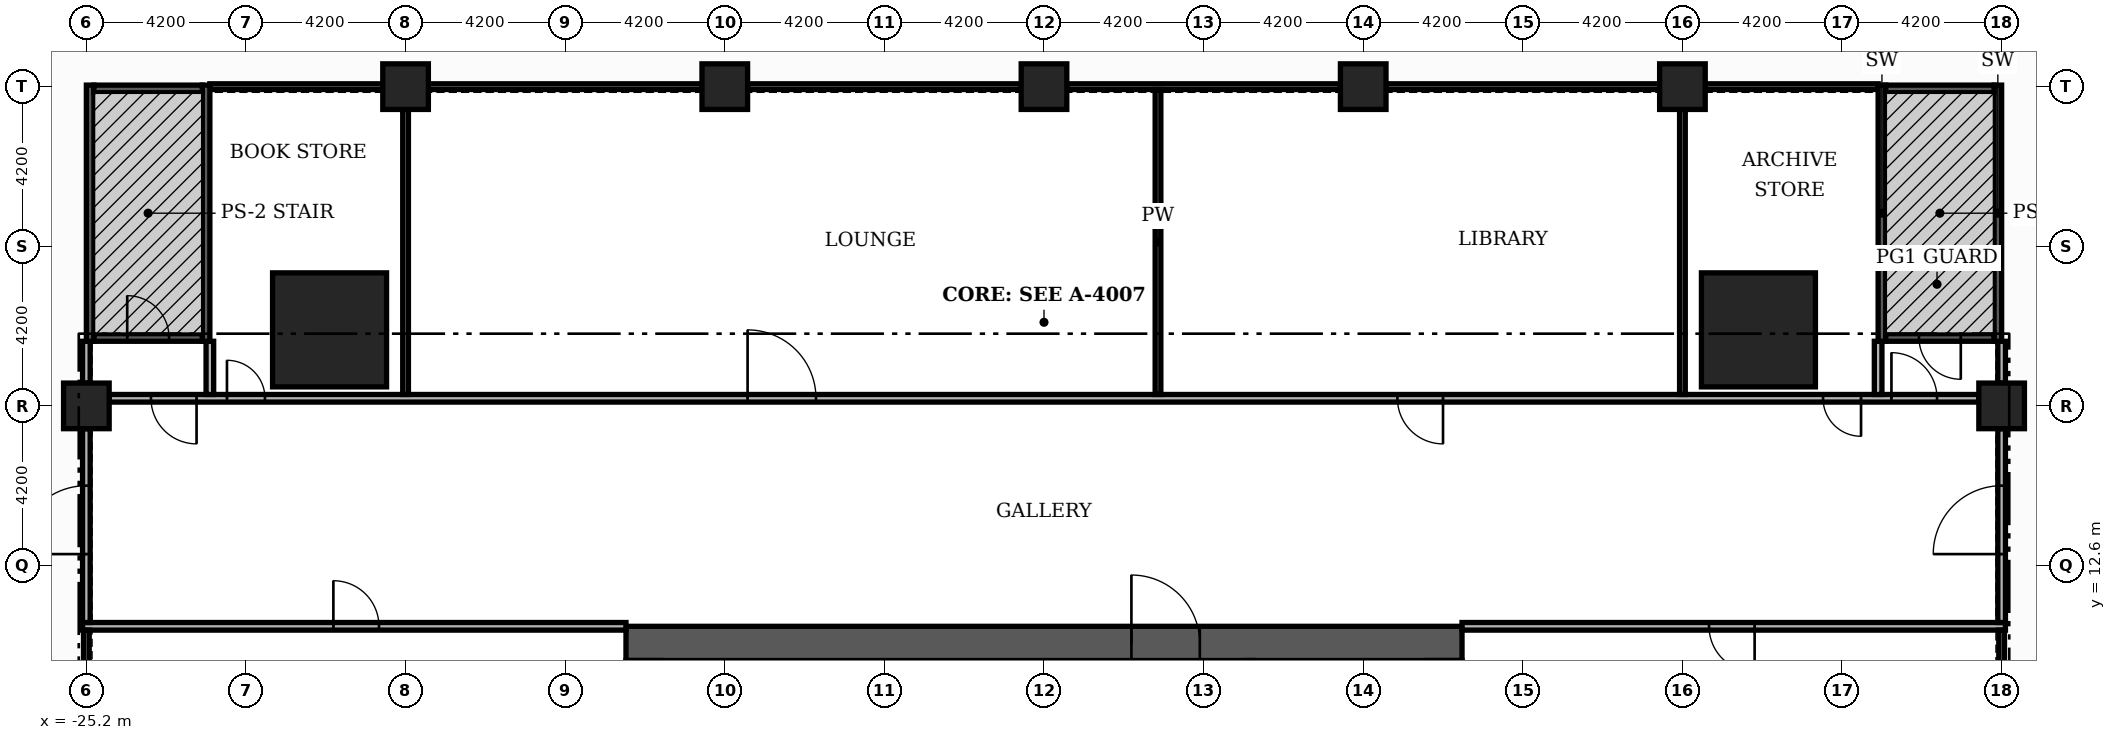
"""IFC4 building model, lengths in metres.
Left out: names, types, materials, properties, quantities, classifications, styles, units other than length and angle.
Written with IfcOpenShell. Run it as: python <this file> out.ifc"""

import sys

from ifc_helpers import new_model, si_unit, direction, frame, frame_2d, origin, origin_2d, place, context, subcontext, project, spatial, rectangle, extrude, element, fill, save


model = new_model("IFC4")
c1 = context("Model", 3, precision=1e-05, world=origin(), true_north=direction((0.0, 1.0)))
c2 = subcontext(c1, "Body", "Model", "MODEL_VIEW")
j1 = project(units=[si_unit("LENGTHUNIT", "METRE"), si_unit("PLANEANGLEUNIT", "RADIAN")], contexts=[c1])
p1 = place(None, origin())
s1 = spatial("IfcSite", under=j1, at=p1, CompositionType="ELEMENT")
p2 = place(p1, origin())
s2 = spatial("IfcBuilding", under=s1, at=p2, CompositionType="ELEMENT")
p3 = place(p2, frame((0.0, 0.0, 22.2)))
s3 = spatial("IfcBuildingStorey", under=s2, at=p3, CompositionType="ELEMENT", Elevation=22.2)
p4 = place(p3, frame((-11.0, 10.55, 0.0), z_axis=(0.0, 0.0, 1.0), x_axis=(1.0, 0.0, 0.0)))
e1 = element("IfcWall", 1, at=p4, inside=s3, PredefinedType="SHEAR", context=c2, shape_type="SweptSolid", body=[
    extrude(rectangle(XDim=22.0, YDim=0.9, at=frame_2d((11.0, 0.0))), origin(), (0.0, 0.0, 1.0), 4.3),
])
p5 = place(p4, frame((13.3, 0.0, 0.0)))
e2 = element("IfcOpeningElement", 2, at=p5, cuts=e1, PredefinedType="OPENING", context=c2, shape_type="SweptSolid", body=[
    extrude(rectangle(XDim=1.8, YDim=2.2, at=frame_2d((0.9, 1.1))), frame((0.0, 0.46, 0.0), z_axis=(0.0, -1.0, 0.0), x_axis=(1.0, 0.0, 0.0)), (0.0, 0.0, 1.0), 0.92),
])
for number, where, z_axis, x_axis in (
    (3, (18.8, 18.8, 0.0), (0.0, 0.0, 1.0), (1.0, 0.0, 0.0)),
    (4, (-18.8, 18.8, 0.0), (0.0, 0.0, 1.0), (1.0, 0.0, 0.0)),
):
    element("IfcColumn", number, at=place(p3, frame(where, z_axis=z_axis, x_axis=x_axis)), inside=s3, PredefinedType="COLUMN", context=c2, shape_type="SweptSolid", body=[
        extrude(rectangle(XDim=3.0, YDim=3.0, at=origin_2d()), origin(), (0.0, 0.0, 1.0), 4.8),
    ])
for number, where, z_axis, x_axis in (
    (5, (25.2, 16.8, 0.0), (0.0, 0.0, 1.0), (1.0, 0.0, 0.0)),
    (6, (0.0, 25.2, 0.0), (0.0, 0.0, 1.0), (1.0, 0.0, 0.0)),
    (7, (-8.4, 25.2, 0.0), (0.0, 0.0, 1.0), (1.0, 0.0, 0.0)),
    (8, (-16.8, 25.2, 0.0), (0.0, 0.0, 1.0), (1.0, 0.0, 0.0)),
    (9, (8.4, 25.2, 0.0), (0.0, 0.0, 1.0), (1.0, 0.0, 0.0)),
    (10, (16.8, 25.2, 0.0), (0.0, 0.0, 1.0), (1.0, 0.0, 0.0)),
    (11, (-25.2, 16.8, 0.0), (0.0, 0.0, 1.0), (1.0, 0.0, 0.0)),
):
    element("IfcColumn", number, at=place(p3, frame(where, z_axis=z_axis, x_axis=x_axis)), inside=s3, PredefinedType="COLUMN", context=c2, shape_type="SweptSolid", body=[
        extrude(rectangle(XDim=1.2, YDim=1.2, at=origin_2d()), origin(), (0.0, 0.0, 1.0), 4.8),
    ])
p6 = place(p3, frame((-25.3, 11.0, 0.0), z_axis=(0.0, 0.0, 1.0), x_axis=(1.0, 0.0, 0.0)))
e12 = element("IfcWall", 12, at=p6, inside=s3, PredefinedType="PARTITIONING", context=c2, shape_type="SweptSolid", body=[
    extrude(rectangle(XDim=14.3, YDim=0.2, at=frame_2d((7.15, 0.0))), origin(), (0.0, 0.0, 1.0), 4.3),
])
p7 = place(p6, frame((6.6, 0.0, 0.0)))
e13 = element("IfcOpeningElement", 13, at=p7, cuts=e12, PredefinedType="OPENING", context=c2, shape_type="SweptSolid", body=[
    extrude(rectangle(XDim=1.2, YDim=2.2, at=frame_2d((0.6, 1.1))), frame((0.0, 0.11, 0.0), z_axis=(0.0, -1.0, 0.0), x_axis=(1.0, 0.0, 0.0)), (0.0, 0.0, 1.0), 0.22),
])
p8 = place(p3, frame((11.0, 11.0, 0.0), z_axis=(0.0, 0.0, 1.0), x_axis=(1.0, 0.0, 0.0)))
e14 = element("IfcWall", 14, at=p8, inside=s3, PredefinedType="PARTITIONING", context=c2, shape_type="SweptSolid", body=[
    extrude(rectangle(XDim=14.3, YDim=0.2, at=frame_2d((7.15, 0.0))), origin(), (0.0, 0.0, 1.0), 4.3),
])
p9 = place(p8, frame((6.5, 0.0, 0.0)))
e15 = element("IfcOpeningElement", 15, at=p9, cuts=e14, PredefinedType="OPENING", context=c2, shape_type="SweptSolid", body=[
    extrude(rectangle(XDim=1.2, YDim=2.2, at=frame_2d((0.6, 1.1))), frame((0.0, 0.11, 0.0), z_axis=(0.0, -1.0, 0.0), x_axis=(1.0, 0.0, 0.0)), (0.0, 0.0, 1.0), 0.22),
])
p10 = place(p3, frame((-24.6, 17.0, 0.0), z_axis=(0.0, 0.0, 1.0), x_axis=(1.0, 0.0, 0.0)))
e16 = element("IfcWall", 16, at=p10, inside=s3, PredefinedType="PARTITIONING", context=c2, shape_type="SweptSolid", body=[
    extrude(rectangle(XDim=49.2, YDim=0.2, at=frame_2d((24.6, 0.0))), origin(), (0.0, 0.0, 1.0), 4.3),
])
p11 = place(p10, frame((1.1, 0.0, 0.0)))
e17 = element("IfcOpeningElement", 17, at=p11, cuts=e16, PredefinedType="OPENING", context=c2, shape_type="SweptSolid", body=[
    extrude(rectangle(XDim=1.2, YDim=2.2, at=frame_2d((0.6, 1.1))), frame((0.0, 0.11, 0.0), z_axis=(0.0, -1.0, 0.0), x_axis=(1.0, 0.0, 0.0)), (0.0, 0.0, 1.0), 0.22),
])
p12 = place(p10, frame((3.1, 0.0, 0.0)))
e18 = element("IfcOpeningElement", 18, at=p12, cuts=e16, PredefinedType="OPENING", context=c2, shape_type="SweptSolid", body=[
    extrude(rectangle(XDim=1.0, YDim=2.1, at=frame_2d((0.5, 1.05))), frame((0.0, 0.11, 0.0), z_axis=(0.0, -1.0, 0.0), x_axis=(1.0, 0.0, 0.0)), (0.0, 0.0, 1.0), 0.22),
])
p13 = place(p10, frame((16.8, 0.0, 0.0)))
e19 = element("IfcOpeningElement", 19, at=p13, cuts=e16, PredefinedType="OPENING", context=c2, shape_type="SweptSolid", body=[
    extrude(rectangle(XDim=1.8, YDim=2.2, at=frame_2d((0.9, 1.1))), frame((0.0, 0.11, 0.0), z_axis=(0.0, -1.0, 0.0), x_axis=(1.0, 0.0, 0.0)), (0.0, 0.0, 1.0), 0.22),
])
p14 = place(p10, frame((33.9, 0.0, 0.0)))
e20 = element("IfcOpeningElement", 20, at=p14, cuts=e16, PredefinedType="OPENING", context=c2, shape_type="SweptSolid", body=[
    extrude(rectangle(XDim=1.2, YDim=2.2, at=frame_2d((0.6, 1.1))), frame((0.0, 0.11, 0.0), z_axis=(0.0, -1.0, 0.0), x_axis=(1.0, 0.0, 0.0)), (0.0, 0.0, 1.0), 0.22),
])
p15 = place(p10, frame((45.1, 0.0, 0.0)))
e21 = element("IfcOpeningElement", 21, at=p15, cuts=e16, PredefinedType="OPENING", context=c2, shape_type="SweptSolid", body=[
    extrude(rectangle(XDim=1.0, YDim=2.1, at=frame_2d((0.5, 1.05))), frame((0.0, 0.11, 0.0), z_axis=(0.0, -1.0, 0.0), x_axis=(1.0, 0.0, 0.0)), (0.0, 0.0, 1.0), 0.22),
])
p16 = place(p10, frame((46.9, 0.0, 0.0)))
e22 = element("IfcOpeningElement", 22, at=p16, cuts=e16, PredefinedType="OPENING", context=c2, shape_type="SweptSolid", body=[
    extrude(rectangle(XDim=1.2, YDim=2.2, at=frame_2d((0.6, 1.1))), frame((0.0, 0.11, 0.0), z_axis=(0.0, -1.0, 0.0), x_axis=(1.0, 0.0, 0.0)), (0.0, 0.0, 1.0), 0.22),
])
p17 = place(p3, frame((-21.95, 25.2, 0.0), z_axis=(0.0, 0.0, 1.0), x_axis=(1.0, 0.0, 0.0)))
e23 = element("IfcWall", 23, at=p17, inside=s3, PredefinedType="PARTITIONING", context=c2, shape_type="SweptSolid", body=[
    extrude(rectangle(XDim=4.55, YDim=0.15, at=frame_2d((2.275, 0.0))), origin(), (0.0, 0.0, 1.0), 4.3),
])
for number, where, z_axis, x_axis in (
    (24, (-16.2, 25.2, 0.0), (0.0, 0.0, 1.0), (1.0, 0.0, 0.0)),
    (25, (-7.8, 25.2, 0.0), (0.0, 0.0, 1.0), (1.0, 0.0, 0.0)),
    (26, (0.6, 25.2, 0.0), (0.0, 0.0, 1.0), (1.0, 0.0, 0.0)),
    (27, (9.0, 25.2, 0.0), (0.0, 0.0, 1.0), (1.0, 0.0, 0.0)),
):
    element("IfcWall", number, at=place(p3, frame(where, z_axis=z_axis, x_axis=x_axis)), inside=s3, PredefinedType="PARTITIONING", context=c2, shape_type="SweptSolid", body=[
        extrude(rectangle(XDim=7.2, YDim=0.15, at=frame_2d((3.6, 0.0))), origin(), (0.0, 0.0, 1.0), 4.3),
    ])
p18 = place(p3, frame((17.4, 25.2, 0.0), z_axis=(0.0, 0.0, 1.0), x_axis=(1.0, 0.0, 0.0)))
e28 = element("IfcWall", 28, at=p18, inside=s3, PredefinedType="PARTITIONING", context=c2, shape_type="SweptSolid", body=[
    extrude(rectangle(XDim=4.55, YDim=0.15, at=frame_2d((2.275, 0.0))), origin(), (0.0, 0.0, 1.0), 4.3),
])
p19 = place(p3, frame((-25.2, 9.0, 0.0), z_axis=(0.0, 0.0, 1.0), x_axis=(0.0, 1.0, 0.0)))
e29 = element("IfcWall", 29, at=p19, inside=s3, PredefinedType="PARTITIONING", context=c2, shape_type="SweptSolid", body=[
    extrude(rectangle(XDim=1.9, YDim=0.15, at=frame_2d((0.95, 0.0))), origin(), (0.0, 0.0, 1.0), 4.3),
])
p20 = place(p3, frame((-25.2, 11.1, 0.0), z_axis=(0.0, 0.0, 1.0), x_axis=(0.0, 1.0, 0.0)))
e30 = element("IfcWall", 30, at=p20, inside=s3, PredefinedType="PARTITIONING", context=c2, shape_type="SweptSolid", body=[
    extrude(rectangle(XDim=5.1, YDim=0.2, at=frame_2d((2.55, 0.0))), origin(), (0.0, 0.0, 1.0), 4.3),
])
p21 = place(p20, frame((1.8, 0.0, 0.0)))
e31 = element("IfcOpeningElement", 31, at=p21, cuts=e30, PredefinedType="OPENING", context=c2, shape_type="SweptSolid", body=[
    extrude(rectangle(XDim=1.8, YDim=2.2, at=frame_2d((0.9, 1.1))), frame((0.0, 0.11, 0.0), z_axis=(0.0, -1.0, 0.0), x_axis=(1.0, 0.0, 0.0)), (0.0, 0.0, 1.0), 0.22),
])
p22 = place(p3, frame((-25.2, 17.4, 0.0), z_axis=(0.0, 0.0, 1.0), x_axis=(0.0, 1.0, 0.0)))
e32 = element("IfcWall", 32, at=p22, inside=s3, PredefinedType="PARTITIONING", context=c2, shape_type="SweptSolid", body=[
    extrude(rectangle(XDim=1.1, YDim=0.2, at=frame_2d((0.55, 0.0))), origin(), (0.0, 0.0, 1.0), 4.3),
])
p23 = place(p3, frame((-21.95, 17.1, 0.0), z_axis=(0.0, 0.0, 1.0), x_axis=(0.0, 1.0, 0.0)))
e33 = element("IfcWall", 33, at=p23, inside=s3, PredefinedType="PARTITIONING", context=c2, shape_type="SweptSolid", body=[
    extrude(rectangle(XDim=1.4, YDim=0.2, at=frame_2d((0.7, 0.0))), origin(), (0.0, 0.0, 1.0), 4.3),
])
p24 = place(p3, frame((-16.8, 17.1, 0.0), z_axis=(0.0, 0.0, 1.0), x_axis=(0.0, 1.0, 0.0)))
e34 = element("IfcWall", 34, at=p24, inside=s3, PredefinedType="PARTITIONING", context=c2, shape_type="SweptSolid", body=[
    extrude(rectangle(XDim=7.5, YDim=0.15, at=frame_2d((3.75, 0.0))), origin(), (0.0, 0.0, 1.0), 4.3),
])
p25 = place(p3, frame((3.0, 17.1, 0.0), z_axis=(0.0, 0.0, 1.0), x_axis=(0.0, 1.0, 0.0)))
e35 = element("IfcWall", 35, at=p25, inside=s3, PredefinedType="PARTITIONING", context=c2, shape_type="SweptSolid", body=[
    extrude(rectangle(XDim=8.025, YDim=0.15, at=frame_2d((4.012, 0.0))), origin(), (0.0, 0.0, 1.0), 4.3),
])
p26 = place(p3, frame((16.8, 17.1, 0.0), z_axis=(0.0, 0.0, 1.0), x_axis=(0.0, 1.0, 0.0)))
e36 = element("IfcWall", 36, at=p26, inside=s3, PredefinedType="PARTITIONING", context=c2, shape_type="SweptSolid", body=[
    extrude(rectangle(XDim=7.5, YDim=0.15, at=frame_2d((3.75, 0.0))), origin(), (0.0, 0.0, 1.0), 4.3),
])
p27 = place(p3, frame((21.95, 17.1, 0.0), z_axis=(0.0, 0.0, 1.0), x_axis=(0.0, 1.0, 0.0)))
e37 = element("IfcWall", 37, at=p27, inside=s3, PredefinedType="PARTITIONING", context=c2, shape_type="SweptSolid", body=[
    extrude(rectangle(XDim=1.4, YDim=0.2, at=frame_2d((0.7, 0.0))), origin(), (0.0, 0.0, 1.0), 4.3),
])
p28 = place(p3, frame((25.2, 9.0, 0.0), z_axis=(0.0, 0.0, 1.0), x_axis=(0.0, 1.0, 0.0)))
e38 = element("IfcWall", 38, at=p28, inside=s3, PredefinedType="PARTITIONING", context=c2, shape_type="SweptSolid", body=[
    extrude(rectangle(XDim=1.9, YDim=0.15, at=frame_2d((0.95, 0.0))), origin(), (0.0, 0.0, 1.0), 4.3),
])
p29 = place(p3, frame((25.2, 11.1, 0.0), z_axis=(0.0, 0.0, 1.0), x_axis=(0.0, 1.0, 0.0)))
e39 = element("IfcWall", 39, at=p29, inside=s3, PredefinedType="PARTITIONING", context=c2, shape_type="SweptSolid", body=[
    extrude(rectangle(XDim=5.1, YDim=0.2, at=frame_2d((2.55, 0.0))), origin(), (0.0, 0.0, 1.0), 4.3),
])
p30 = place(p29, frame((1.8, 0.0, 0.0)))
e40 = element("IfcOpeningElement", 40, at=p30, cuts=e39, PredefinedType="OPENING", context=c2, shape_type="SweptSolid", body=[
    extrude(rectangle(XDim=1.8, YDim=2.2, at=frame_2d((0.9, 1.1))), frame((0.0, 0.11, 0.0), z_axis=(0.0, -1.0, 0.0), x_axis=(1.0, 0.0, 0.0)), (0.0, 0.0, 1.0), 0.22),
])
p31 = place(p3, frame((25.2, 17.4, 0.0), z_axis=(0.0, 0.0, 1.0), x_axis=(0.0, 1.0, 0.0)))
e41 = element("IfcWall", 41, at=p31, inside=s3, PredefinedType="PARTITIONING", context=c2, shape_type="SweptSolid", body=[
    extrude(rectangle(XDim=1.1, YDim=0.2, at=frame_2d((0.55, 0.0))), origin(), (0.0, 0.0, 1.0), 4.3),
])
for number, where, z_axis, x_axis in (
    (42, (22.05, 18.5, 0.0), (0.0, 0.0, 1.0), (0.0, 1.0, 0.0)),
    (43, (25.1, 18.5, 0.0), (0.0, 0.0, 1.0), (0.0, 1.0, 0.0)),
):
    element("IfcWall", number, at=place(p3, frame(where, z_axis=z_axis, x_axis=x_axis)), inside=s3, PredefinedType="SOLIDWALL", context=c2, shape_type="SweptSolid", body=[
        extrude(rectangle(XDim=6.74, YDim=0.2, at=frame_2d((3.37, 0.0))), origin(), (0.0, 0.0, 1.0), 4.3),
    ])
p32 = place(p3, frame((22.15, 18.6, 0.0), z_axis=(0.0, 0.0, 1.0), x_axis=(1.0, 0.0, 0.0)))
e44 = element("IfcWall", 44, at=p32, inside=s3, PredefinedType="SOLIDWALL", context=c2, shape_type="SweptSolid", body=[
    extrude(rectangle(XDim=2.85, YDim=0.2, at=frame_2d((1.425, 0.0))), origin(), (0.0, 0.0, 1.0), 4.3),
])
p33 = place(p32, frame((0.875, 0.0, 0.0)))
e45 = element("IfcOpeningElement", 45, at=p33, cuts=e44, PredefinedType="OPENING", context=c2, shape_type="SweptSolid", body=[
    extrude(rectangle(XDim=1.1, YDim=2.2, at=frame_2d((0.55, 1.1))), frame((0.0, 0.11, 0.0), z_axis=(0.0, -1.0, 0.0), x_axis=(1.0, 0.0, 0.0)), (0.0, 0.0, 1.0), 0.22),
])
p34 = place(p3, frame((22.15, 25.14, 0.0), z_axis=(0.0, 0.0, 1.0), x_axis=(1.0, 0.0, 0.0)))
e46 = element("IfcWall", 46, at=p34, inside=s3, PredefinedType="SOLIDWALL", context=c2, shape_type="SweptSolid", body=[
    extrude(rectangle(XDim=2.85, YDim=0.2, at=frame_2d((1.425, 0.0))), origin(), (0.0, 0.0, 1.0), 4.3),
])
for number, where, z_axis, x_axis in (
    (47, (-25.1, 18.5, 0.0), (0.0, 0.0, 1.0), (0.0, 1.0, 0.0)),
    (48, (-22.05, 18.5, 0.0), (0.0, 0.0, 1.0), (0.0, 1.0, 0.0)),
):
    element("IfcWall", number, at=place(p3, frame(where, z_axis=z_axis, x_axis=x_axis)), inside=s3, PredefinedType="SOLIDWALL", context=c2, shape_type="SweptSolid", body=[
        extrude(rectangle(XDim=6.74, YDim=0.2, at=frame_2d((3.37, 0.0))), origin(), (0.0, 0.0, 1.0), 4.3),
    ])
p35 = place(p3, frame((-25.0, 18.6, 0.0), z_axis=(0.0, 0.0, 1.0), x_axis=(1.0, 0.0, 0.0)))
e49 = element("IfcWall", 49, at=p35, inside=s3, PredefinedType="SOLIDWALL", context=c2, shape_type="SweptSolid", body=[
    extrude(rectangle(XDim=2.85, YDim=0.2, at=frame_2d((1.425, 0.0))), origin(), (0.0, 0.0, 1.0), 4.3),
])
p36 = place(p35, frame((0.875, 0.0, 0.0)))
e50 = element("IfcOpeningElement", 50, at=p36, cuts=e49, PredefinedType="OPENING", context=c2, shape_type="SweptSolid", body=[
    extrude(rectangle(XDim=1.1, YDim=2.2, at=frame_2d((0.55, 1.1))), frame((0.0, 0.11, 0.0), z_axis=(0.0, -1.0, 0.0), x_axis=(1.0, 0.0, 0.0)), (0.0, 0.0, 1.0), 0.22),
])
p37 = place(p3, frame((-25.0, 25.14, 0.0), z_axis=(0.0, 0.0, 1.0), x_axis=(1.0, 0.0, 0.0)))
e51 = element("IfcWall", 51, at=p37, inside=s3, PredefinedType="SOLIDWALL", context=c2, shape_type="SweptSolid", body=[
    extrude(rectangle(XDim=2.85, YDim=0.2, at=frame_2d((1.425, 0.0))), origin(), (0.0, 0.0, 1.0), 4.3),
])
p38 = place(p5, origin())
e52 = element("IfcDoor", 52, at=p38, inside=s3, OperationType="DOUBLE_DOOR_SINGLE_SWING", PredefinedType="DOOR", context=c2, shape_type="SweptSolid", body=[
    extrude(rectangle(XDim=1.8, YDim=2.2, at=frame_2d((0.9, 1.1))), frame((0.0, 0.025, 0.0), z_axis=(0.0, -1.0, 0.0), x_axis=(1.0, 0.0, 0.0)), (0.0, 0.0, 1.0), 0.05),
])
fill(e2, e52)
p39 = place(p7, origin())
e53 = element("IfcDoor", 53, at=p39, inside=s3, OperationType="SINGLE_SWING_LEFT", PredefinedType="DOOR", context=c2, shape_type="SweptSolid", body=[
    extrude(rectangle(XDim=1.2, YDim=2.2, at=frame_2d((0.6, 1.1))), frame((0.0, 0.025, 0.0), z_axis=(0.0, -1.0, 0.0), x_axis=(1.0, 0.0, 0.0)), (0.0, 0.0, 1.0), 0.05),
])
fill(e13, e53)
p40 = place(p9, origin())
e54 = element("IfcDoor", 54, at=p40, inside=s3, OperationType="SINGLE_SWING_RIGHT", PredefinedType="DOOR", context=c2, shape_type="SweptSolid", body=[
    extrude(rectangle(XDim=1.2, YDim=2.2, at=frame_2d((0.6, 1.1))), frame((0.0, 0.025, 0.0), z_axis=(0.0, -1.0, 0.0), x_axis=(1.0, 0.0, 0.0)), (0.0, 0.0, 1.0), 0.05),
])
fill(e15, e54)
p41 = place(p21, origin())
e55 = element("IfcDoor", 55, at=p41, inside=s3, OperationType="DOUBLE_DOOR_SINGLE_SWING", PredefinedType="DOOR", context=c2, shape_type="SweptSolid", body=[
    extrude(rectangle(XDim=1.8, YDim=2.2, at=frame_2d((0.9, 1.1))), frame((0.0, 0.025, 0.0), z_axis=(0.0, -1.0, 0.0), x_axis=(1.0, 0.0, 0.0)), (0.0, 0.0, 1.0), 0.05),
])
fill(e31, e55)
p42 = place(p30, origin())
e56 = element("IfcDoor", 56, at=p42, inside=s3, OperationType="DOUBLE_DOOR_SINGLE_SWING", PredefinedType="DOOR", context=c2, shape_type="SweptSolid", body=[
    extrude(rectangle(XDim=1.8, YDim=2.2, at=frame_2d((0.9, 1.1))), frame((0.0, 0.025, 0.0), z_axis=(0.0, -1.0, 0.0), x_axis=(1.0, 0.0, 0.0)), (0.0, 0.0, 1.0), 0.05),
])
fill(e40, e56)
p43 = place(p11, origin())
e57 = element("IfcDoor", 57, at=p43, inside=s3, OperationType="SINGLE_SWING_RIGHT", PredefinedType="DOOR", context=c2, shape_type="SweptSolid", body=[
    extrude(rectangle(XDim=1.2, YDim=2.2, at=frame_2d((0.6, 1.1))), frame((0.0, 0.025, 0.0), z_axis=(0.0, -1.0, 0.0), x_axis=(1.0, 0.0, 0.0)), (0.0, 0.0, 1.0), 0.05),
])
fill(e17, e57)
p44 = place(p12, origin())
e58 = element("IfcDoor", 58, at=p44, inside=s3, OperationType="SINGLE_SWING_LEFT", PredefinedType="DOOR", context=c2, shape_type="SweptSolid", body=[
    extrude(rectangle(XDim=1.0, YDim=2.1, at=frame_2d((0.5, 1.05))), frame((0.0, 0.025, 0.0), z_axis=(0.0, -1.0, 0.0), x_axis=(1.0, 0.0, 0.0)), (0.0, 0.0, 1.0), 0.05),
])
fill(e18, e58)
p45 = place(p13, origin())
e59 = element("IfcDoor", 59, at=p45, inside=s3, OperationType="DOUBLE_DOOR_SINGLE_SWING", PredefinedType="DOOR", context=c2, shape_type="SweptSolid", body=[
    extrude(rectangle(XDim=1.8, YDim=2.2, at=frame_2d((0.9, 1.1))), frame((0.0, 0.025, 0.0), z_axis=(0.0, -1.0, 0.0), x_axis=(1.0, 0.0, 0.0)), (0.0, 0.0, 1.0), 0.05),
])
fill(e19, e59)
p46 = place(p14, origin())
e60 = element("IfcDoor", 60, at=p46, inside=s3, OperationType="SINGLE_SWING_RIGHT", PredefinedType="DOOR", context=c2, shape_type="SweptSolid", body=[
    extrude(rectangle(XDim=1.2, YDim=2.2, at=frame_2d((0.6, 1.1))), frame((0.0, 0.025, 0.0), z_axis=(0.0, -1.0, 0.0), x_axis=(1.0, 0.0, 0.0)), (0.0, 0.0, 1.0), 0.05),
])
fill(e20, e60)
p47 = place(p15, origin())
e61 = element("IfcDoor", 61, at=p47, inside=s3, OperationType="SINGLE_SWING_RIGHT", PredefinedType="DOOR", context=c2, shape_type="SweptSolid", body=[
    extrude(rectangle(XDim=1.0, YDim=2.1, at=frame_2d((0.5, 1.05))), frame((0.0, 0.025, 0.0), z_axis=(0.0, -1.0, 0.0), x_axis=(1.0, 0.0, 0.0)), (0.0, 0.0, 1.0), 0.05),
])
fill(e21, e61)
p48 = place(p16, origin())
e62 = element("IfcDoor", 62, at=p48, inside=s3, OperationType="SINGLE_SWING_LEFT", PredefinedType="DOOR", context=c2, shape_type="SweptSolid", body=[
    extrude(rectangle(XDim=1.2, YDim=2.2, at=frame_2d((0.6, 1.1))), frame((0.0, 0.025, 0.0), z_axis=(0.0, -1.0, 0.0), x_axis=(1.0, 0.0, 0.0)), (0.0, 0.0, 1.0), 0.05),
])
fill(e22, e62)
p49 = place(p33, origin())
e63 = element("IfcDoor", 63, at=p49, inside=s3, OperationType="SINGLE_SWING_RIGHT", PredefinedType="DOOR", context=c2, shape_type="SweptSolid", body=[
    extrude(rectangle(XDim=1.1, YDim=2.2, at=frame_2d((0.55, 1.1))), frame((0.0, 0.025, 0.0), z_axis=(0.0, -1.0, 0.0), x_axis=(1.0, 0.0, 0.0)), (0.0, 0.0, 1.0), 0.05),
])
fill(e45, e63)
p50 = place(p36, origin())
e64 = element("IfcDoor", 64, at=p50, inside=s3, OperationType="SINGLE_SWING_LEFT", PredefinedType="DOOR", context=c2, shape_type="SweptSolid", body=[
    extrude(rectangle(XDim=1.1, YDim=2.2, at=frame_2d((0.55, 1.1))), frame((0.0, 0.025, 0.0), z_axis=(0.0, -1.0, 0.0), x_axis=(1.0, 0.0, 0.0)), (0.0, 0.0, 1.0), 0.05),
])
fill(e50, e64)
save(model, sys.argv[1])
